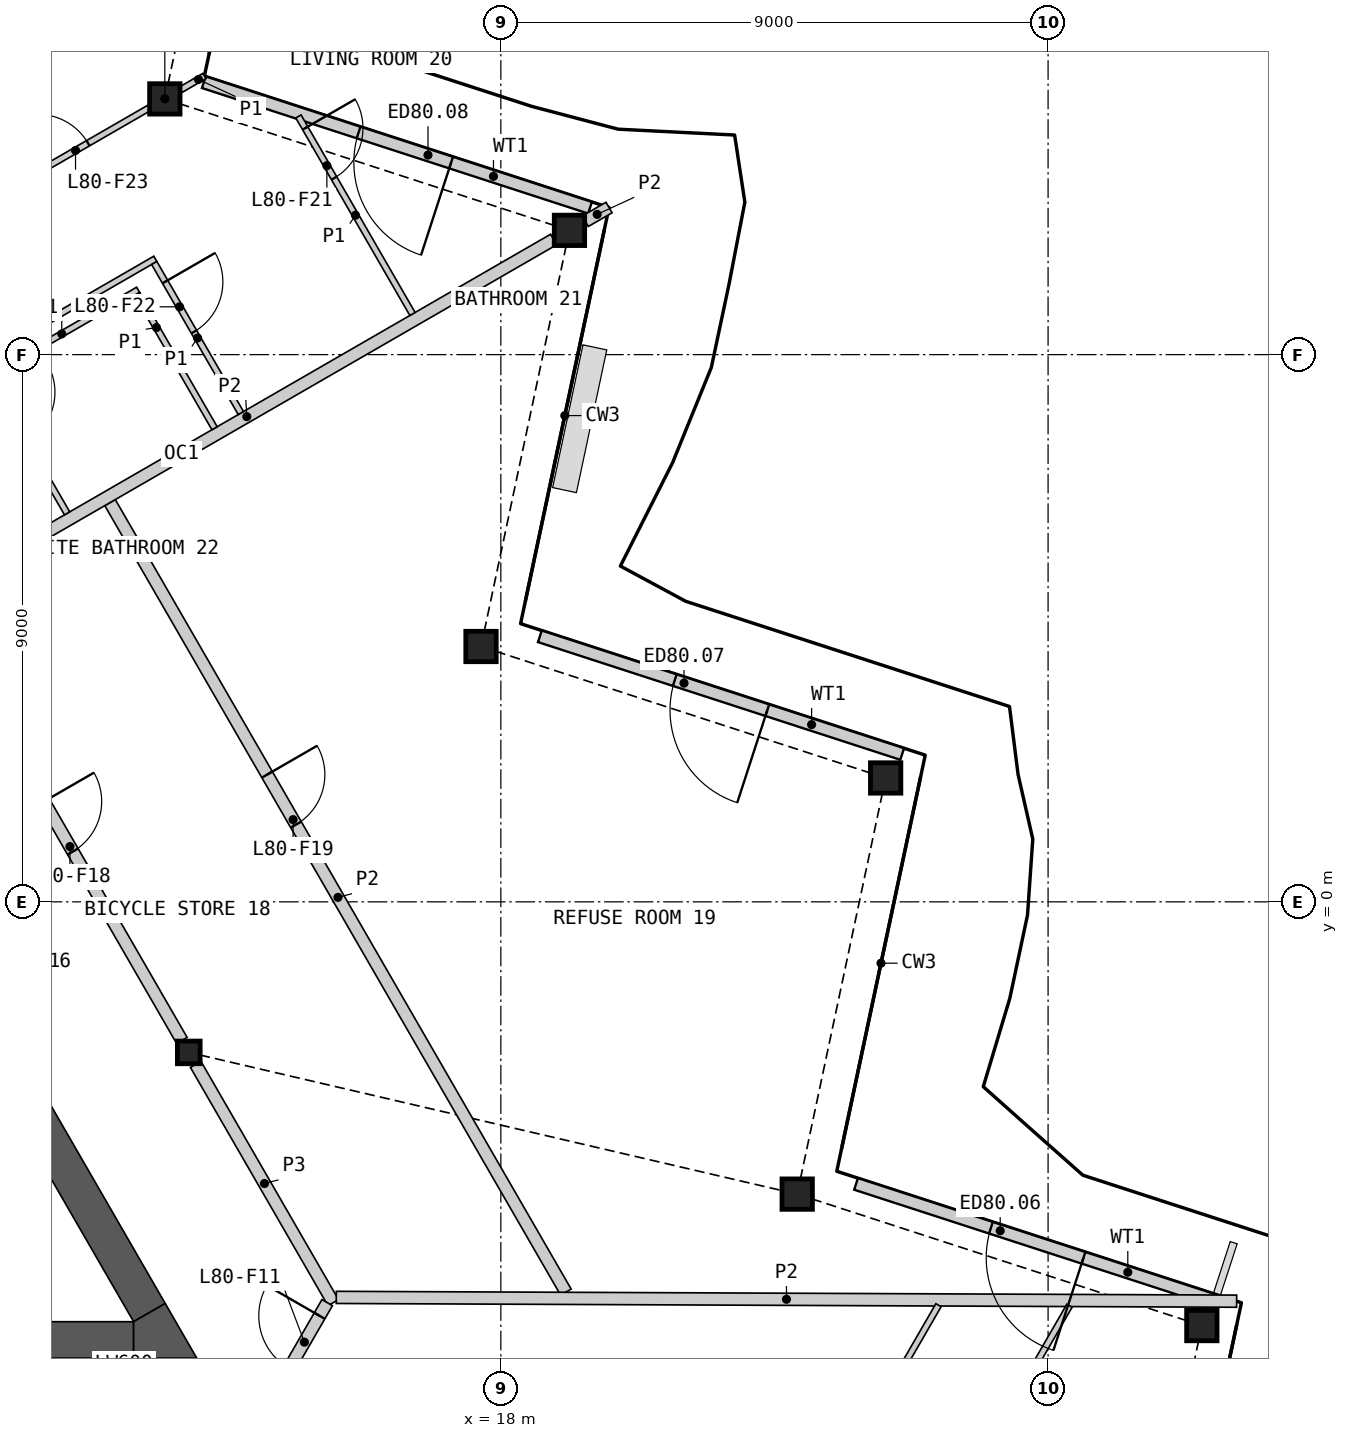
"""IFC4 building model, lengths in metres.
Left out: names, types, materials, properties, quantities, classifications, styles, units other than length and angle.
Written with IfcOpenShell. Run it as: python <this file> out.ifc"""

import sys

from ifc_helpers import new_model, si_unit, direction, frame, frame_2d, origin, origin_2d, place, context, subcontext, project, spatial, polyline, rectangle, hollow_rectangle, i_section, outline, extrude, element, fill, save


model = new_model("IFC4")
c1 = context("Model", 3, precision=1e-05, world=origin(), true_north=direction((0.0, 1.0)))
c2 = subcontext(c1, "Body", "Model", "MODEL_VIEW")
j1 = project(units=[si_unit("LENGTHUNIT", "METRE"), si_unit("PLANEANGLEUNIT", "RADIAN")], contexts=[c1])
p1 = place(None, origin())
s1 = spatial("IfcSite", under=j1, at=p1, CompositionType="ELEMENT")
p2 = place(p1, origin())
s2 = spatial("IfcBuilding", under=s1, at=p2, CompositionType="ELEMENT")
p3 = place(p2, frame((0.0, 0.0, 361.0)))
s3 = spatial("IfcBuildingStorey", under=s2, at=p3, CompositionType="ELEMENT", Elevation=361.0)
for number, where, z_axis, x_axis in (
    (1, (29.529, -6.969, 0.0), (0.0, 0.0, 1.0), (1.0, 0.0, 0.0)),
    (2, (22.874, -4.807, 0.0), (0.0, 0.0, 1.0), (1.0, 0.0, 0.0)),
    (3, (24.329, 2.037, 0.0), (0.0, 0.0, 1.0), (1.0, 0.0, 0.0)),
    (4, (17.674, 4.199, 0.0), (0.0, 0.0, 1.0), (1.0, 0.0, 0.0)),
    (5, (19.129, 11.044, 0.0), (0.0, 0.0, 1.0), (1.0, 0.0, 0.0)),
    (6, (12.474, 13.206, 0.0), (0.0, 0.0, 1.0), (1.0, 0.0, 0.0)),
):
    element("IfcColumn", number, at=place(p3, frame(where, z_axis=z_axis, x_axis=x_axis)), inside=s3, PredefinedType="COLUMN", context=c2, shape_type="SweptSolid", body=[
        extrude(hollow_rectangle(XDim=0.5, YDim=0.5, WallThickness=0.03, at=origin_2d()), origin(), (0.0, 0.0, 1.0), 3.4),
    ])
p4 = place(p3, frame((12.868, -2.476, 0.0), z_axis=(0.0, 0.0, 1.0), x_axis=(1.0, 0.0, 0.0)))
e7 = element("IfcColumn", 7, at=p4, inside=s3, PredefinedType="COLUMN", context=c2, shape_type="SweptSolid", body=[
    extrude(i_section(OverallWidth=0.374, OverallDepth=0.372, WebThickness=0.016, FlangeThickness=0.026, at=origin_2d()), origin(), (0.0, 0.0, 1.0), 3.4),
])
p5 = place(p3, frame((29.801, -6.576, 0.0), z_axis=(0.0, 0.0, 1.0), x_axis=(-0.951060123915, 0.309005891041, 0.0)))
e8 = element("IfcWall", 8, at=p5, inside=s3, PredefinedType="SOLIDWALL", context=c2, shape_type="SweptSolid", body=[
    extrude(rectangle(XDim=6.265, YDim=0.2, at=frame_2d((3.133, 0.0))), origin(), (0.0, 0.0, 1.0), 2.634),
])
p6 = place(p5, frame((2.333, 0.0, 0.0)))
e9 = element("IfcOpeningElement", 9, at=p6, cuts=e8, PredefinedType="OPENING", context=c2, shape_type="SweptSolid", body=[
    extrude(rectangle(XDim=1.6, YDim=2.25, at=frame_2d((0.8, 1.125))), frame((0.0, 0.11, 0.0), z_axis=(0.0, -1.0, 0.0), x_axis=(1.0, 0.0, 0.0)), (0.0, 0.0, 1.0), 0.22),
])
p7 = place(p3, frame((24.601, 2.431, 0.0), z_axis=(0.0, 0.0, 1.0), x_axis=(-0.951060123915, 0.309005891041, 0.0)))
e10 = element("IfcWall", 10, at=p7, inside=s3, PredefinedType="SOLIDWALL", context=c2, shape_type="SweptSolid", body=[
    extrude(rectangle(XDim=6.265, YDim=0.2, at=frame_2d((3.133, 0.0))), origin(), (0.0, 0.0, 1.0), 2.634),
])
p8 = place(p7, frame((2.333, 0.0, 0.0)))
e11 = element("IfcOpeningElement", 11, at=p8, cuts=e10, PredefinedType="OPENING", context=c2, shape_type="SweptSolid", body=[
    extrude(rectangle(XDim=1.6, YDim=2.25, at=frame_2d((0.8, 1.125))), frame((0.0, 0.11, 0.0), z_axis=(0.0, -1.0, 0.0), x_axis=(1.0, 0.0, 0.0)), (0.0, 0.0, 1.0), 0.22),
])
p9 = place(p3, frame((19.467, 11.416, 0.0), z_axis=(0.0, 0.0, 1.0), x_axis=(-0.951057706878, 0.309013330114, 0.0)))
e12 = element("IfcWall", 12, at=p9, inside=s3, PredefinedType="SOLIDWALL", context=c2, shape_type="SweptSolid", body=[
    extrude(rectangle(XDim=6.678, YDim=0.2, at=frame_2d((3.339, 0.0))), origin(), (0.0, 0.0, 1.0), 2.634),
])
p10 = place(p9, frame((2.402, 0.0, 0.0)))
e13 = element("IfcOpeningElement", 13, at=p10, cuts=e12, PredefinedType="OPENING", context=c2, shape_type="SweptSolid", body=[
    extrude(rectangle(XDim=1.6, YDim=2.25, at=frame_2d((0.8, 1.125))), frame((0.0, 0.11, 0.0), z_axis=(0.0, -1.0, 0.0), x_axis=(1.0, 0.0, 0.0)), (0.0, 0.0, 1.0), 0.22),
])
p11 = place(p3, frame((-11.961, -7.206, 0.0), z_axis=(0.0, 0.0, 1.0), x_axis=(1.0, 0.0, 0.0)))
e14 = element("IfcWall", 14, at=p11, inside=s3, PredefinedType="SHEAR", context=c2, shape_type="SweptSolid", body=[
    extrude(rectangle(XDim=23.921, YDim=0.6, at=frame_2d((11.961, 0.0))), origin(), (0.0, 0.0, 1.0), 3.1),
])
p12 = place(p3, frame((12.221, -6.756, 0.0), z_axis=(0.0, 0.0, 1.0), x_axis=(-0.50000604952, 0.866021911064, 0.0)))
e15 = element("IfcWall", 15, at=p12, inside=s3, PredefinedType="SHEAR", context=c2, shape_type="SweptSolid", body=[
    extrude(rectangle(XDim=4.869, YDim=0.6, at=frame_2d((2.434, 0.0))), origin(), (0.0, 0.0, 1.0), 3.1),
])
p13 = place(p3, origin())
e16 = element("IfcWall", 16, at=p13, inside=s3, PredefinedType="SHEAR", context=c2, shape_type="SweptSolid", body=[
    extrude(outline(polyline([(11.961, -7.506), (11.961, -6.906), (12.48, -6.606), (13.0, -7.506), (11.961, -7.506)])), origin(), (0.0, 0.0, 1.0), 3.1),
])
p14 = place(p3, frame((8.692, 4.756, 0.0), z_axis=(0.0, 0.0, 1.0), x_axis=(0.500001682468, -0.866024432409, 0.0)))
e17 = element("IfcWall", 17, at=p14, inside=s3, PredefinedType="PARTITIONING", context=c2, shape_type="SweptSolid", body=[
    extrude(rectangle(XDim=8.124, YDim=0.2, at=frame_2d((4.062, 0.0))), origin(), (0.0, 0.0, 1.0), 3.1),
])
p15 = place(p14, frame((3.587, 0.0, 0.0)))
e18 = element("IfcOpeningElement", 18, at=p15, cuts=e17, PredefinedType="OPENING", context=c2, shape_type="SweptSolid", body=[
    extrude(rectangle(XDim=0.95, YDim=2.1, at=frame_2d((0.475, 1.05))), frame((0.0, 0.11, 0.0), z_axis=(0.0, -1.0, 0.0), x_axis=(1.0, 0.0, 0.0)), (0.0, 0.0, 1.0), 0.22),
])
p16 = place(p3, frame((12.981, -2.673, 0.0), z_axis=(0.0, 0.0, 1.0), x_axis=(0.499974648164, -0.866040040179, 0.0)))
e19 = element("IfcWall", 19, at=p16, inside=s3, PredefinedType="PARTITIONING", context=c2, shape_type="SweptSolid", body=[
    extrude(rectangle(XDim=4.525, YDim=0.2, at=frame_2d((2.263, 0.0))), origin(), (0.0, 0.0, 1.0), 3.1),
])
p17 = place(p3, frame((13.293, -9.797, 0.0), z_axis=(0.0, 0.0, 1.0), x_axis=(0.499977520935, 0.86603838169, 0.0)))
e20 = element("IfcWall", 20, at=p17, inside=s3, PredefinedType="PARTITIONING", context=c2, shape_type="SweptSolid", body=[
    extrude(rectangle(XDim=3.701, YDim=0.2, at=frame_2d((1.851, 0.0))), origin(), (0.0, 0.0, 1.0), 3.1),
])
p18 = place(p17, frame((2.451, 0.0, 0.0)))
e21 = element("IfcOpeningElement", 21, at=p18, cuts=e20, PredefinedType="OPENING", context=c2, shape_type="SweptSolid", body=[
    extrude(rectangle(XDim=1.0, YDim=2.1, at=frame_2d((0.5, 1.05))), frame((0.0, 0.11, 0.0), z_axis=(0.0, -1.0, 0.0), x_axis=(1.0, 0.0, 0.0)), (0.0, 0.0, 1.0), 0.22),
])
p19 = place(p3, frame((11.573, 6.566, 0.0), z_axis=(0.0, 0.0, 1.0), x_axis=(0.499993542657, -0.866029131901, 0.0)))
e22 = element("IfcWall", 22, at=p19, inside=s3, PredefinedType="PARTITIONING", context=c2, shape_type="SweptSolid", body=[
    extrude(rectangle(XDim=14.994, YDim=0.2, at=frame_2d((7.497, 0.0))), origin(), (0.0, 0.0, 1.0), 2.33),
])
p20 = place(p19, frame((5.166, 0.0, 0.0)))
e23 = element("IfcOpeningElement", 23, at=p20, cuts=e22, PredefinedType="OPENING", context=c2, shape_type="SweptSolid", body=[
    extrude(rectangle(XDim=0.95, YDim=2.1, at=frame_2d((0.475, 1.05))), frame((0.0, 0.11, 0.0), z_axis=(0.0, -1.0, 0.0), x_axis=(1.0, 0.0, 0.0)), (0.0, 0.0, 1.0), 0.22),
])
p21 = place(p3, frame((15.294, -6.506, 0.0), z_axis=(0.0, 0.0, 1.0), x_axis=(0.99999116141, -0.004204414611, 0.0)))
e24 = element("IfcWall", 24, at=p21, inside=s3, PredefinedType="PARTITIONING", context=c2, shape_type="SweptSolid", body=[
    extrude(rectangle(XDim=14.807, YDim=0.2, at=frame_2d((7.404, 0.0))), origin(), (0.0, 0.0, 1.0), 2.33),
])
p22 = place(p3, frame((8.775, 5.066, 0.0), z_axis=(0.0, 0.0, 1.0), x_axis=(0.866023724155, 0.500002909193, 0.0)))
e25 = element("IfcWall", 25, at=p22, inside=s3, PredefinedType="PARTITIONING", context=c2, shape_type="SweptSolid", body=[
    extrude(rectangle(XDim=11.655, YDim=0.2, at=frame_2d((5.827, 0.0))), origin(), (0.0, 0.0, 1.0), 2.33),
])
p23 = place(p3, frame((19.389, 11.194, 0.0), z_axis=(0.0, 0.0, 1.0), x_axis=(0.866104518135, 0.499862944882, 0.0)))
e26 = element("IfcWall", 26, at=p23, inside=s3, PredefinedType="PARTITIONING", context=c2, shape_type="SweptSolid", body=[
    extrude(rectangle(XDim=0.451, YDim=0.2, at=frame_2d((0.226, 0.0))), origin(), (0.0, 0.0, 1.0), 2.33),
])
p24 = place(p3, frame((3.465, 14.01, 0.0), z_axis=(0.0, 0.0, 1.0), x_axis=(0.866032376801, 0.499987922186, 0.0)))
e27 = element("IfcWall", 27, at=p24, inside=s3, PredefinedType="PARTITIONING", context=c2, shape_type="SweptSolid", body=[
    extrude(rectangle(XDim=11.782, YDim=0.1, at=frame_2d((5.891, 0.0))), origin(), (0.0, 0.0, 1.0), 2.33),
])
p25 = place(p24, frame((6.67, 0.0, 0.0)))
e28 = element("IfcOpeningElement", 28, at=p25, cuts=e27, PredefinedType="OPENING", context=c2, shape_type="SweptSolid", body=[
    extrude(rectangle(XDim=0.95, YDim=2.1, at=frame_2d((0.475, 1.05))), frame((0.0, 0.06, 0.0), z_axis=(0.0, -1.0, 0.0), x_axis=(1.0, 0.0, 0.0)), (0.0, 0.0, 1.0), 0.12),
])
p26 = place(p3, frame((23.415, -13.461, 0.0), z_axis=(0.0, 0.0, 1.0), x_axis=(0.500011483804, 0.866018773506, 0.0)))
e29 = element("IfcWall", 29, at=p26, inside=s3, PredefinedType="PARTITIONING", context=c2, shape_type="SweptSolid", body=[
    extrude(rectangle(XDim=7.872, YDim=0.1, at=frame_2d((3.936, 0.0))), origin(), (0.0, 0.0, 1.0), 2.33),
])
p27 = place(p26, frame((3.461, 0.0, 0.0)))
e30 = element("IfcOpeningElement", 30, at=p27, cuts=e29, PredefinedType="OPENING", context=c2, shape_type="SweptSolid", body=[
    extrude(rectangle(XDim=0.95, YDim=2.1, at=frame_2d((0.475, 1.05))), frame((0.0, 0.06, 0.0), z_axis=(0.0, -1.0, 0.0), x_axis=(1.0, 0.0, 0.0)), (0.0, 0.0, 1.0), 0.12),
])
p28 = place(p3, frame((6.065, 9.506, 0.0), z_axis=(0.0, 0.0, 1.0), x_axis=(0.866018949465, 0.500011179042, 0.0)))
e31 = element("IfcWall", 31, at=p28, inside=s3, PredefinedType="PARTITIONING", context=c2, shape_type="SweptSolid", body=[
    extrude(rectangle(XDim=7.1, YDim=0.1, at=frame_2d((3.55, 0.0))), origin(), (0.0, 0.0, 1.0), 2.33),
])
p29 = place(p28, frame((4.992, 0.0, 0.0)))
e32 = element("IfcOpeningElement", 32, at=p29, cuts=e31, PredefinedType="OPENING", context=c2, shape_type="SweptSolid", body=[
    extrude(rectangle(XDim=0.95, YDim=2.1, at=frame_2d((0.475, 1.05))), frame((0.0, 0.06, 0.0), z_axis=(0.0, -1.0, 0.0), x_axis=(1.0, 0.0, 0.0)), (0.0, 0.0, 1.0), 0.12),
])
p30 = place(p3, frame((21.796, -12.526, 0.0), z_axis=(0.0, 0.0, 1.0), x_axis=(0.499994777381, 0.866028419044, 0.0)))
e33 = element("IfcWall", 33, at=p30, inside=s3, PredefinedType="PARTITIONING", context=c2, shape_type="SweptSolid", body=[
    extrude(rectangle(XDim=6.803, YDim=0.1, at=frame_2d((3.402, 0.0))), origin(), (0.0, 0.0, 1.0), 2.33),
])
p31 = place(p30, frame((1.361, 0.0, 0.0)))
e34 = element("IfcOpeningElement", 34, at=p31, cuts=e33, PredefinedType="OPENING", context=c2, shape_type="SweptSolid", body=[
    extrude(rectangle(XDim=0.95, YDim=2.1, at=frame_2d((0.475, 1.05))), frame((0.0, 0.06, 0.0), z_axis=(0.0, -1.0, 0.0), x_axis=(1.0, 0.0, 0.0)), (0.0, 0.0, 1.0), 0.12),
])
p32 = place(p3, frame((7.165, 7.601, 0.0), z_axis=(0.0, 0.0, 1.0), x_axis=(0.866017493347, 0.500013701029, 0.0)))
e35 = element("IfcWall", 35, at=p32, inside=s3, PredefinedType="PARTITIONING", context=c2, shape_type="SweptSolid", body=[
    extrude(rectangle(XDim=5.95, YDim=0.1, at=frame_2d((2.975, 0.0))), origin(), (0.0, 0.0, 1.0), 2.33),
])
p33 = place(p3, frame((14.671, 12.918, 0.0), z_axis=(0.0, 0.0, 1.0), x_axis=(0.499981580887, -0.866036037803, 0.0)))
e36 = element("IfcWall", 36, at=p33, inside=s3, PredefinedType="PARTITIONING", context=c2, shape_type="SweptSolid", body=[
    extrude(rectangle(XDim=3.752, YDim=0.1, at=frame_2d((1.876, 0.0))), origin(), (0.0, 0.0, 1.0), 2.33),
])
p34 = place(p33, frame((0.222, 0.0, 0.0)))
e37 = element("IfcOpeningElement", 37, at=p34, cuts=e36, PredefinedType="OPENING", context=c2, shape_type="SweptSolid", body=[
    extrude(rectangle(XDim=0.95, YDim=2.1, at=frame_2d((0.475, 1.05))), frame((0.0, 0.06, 0.0), z_axis=(0.0, -1.0, 0.0), x_axis=(1.0, 0.0, 0.0)), (0.0, 0.0, 1.0), 0.12),
])
p35 = place(p3, frame((12.3, 10.508, 0.0), z_axis=(0.0, 0.0, 1.0), x_axis=(0.499999279071, -0.866025820012, 0.0)))
e38 = element("IfcWall", 38, at=p35, inside=s3, PredefinedType="PARTITIONING", context=c2, shape_type="SweptSolid", body=[
    extrude(rectangle(XDim=2.85, YDim=0.1, at=frame_2d((1.425, 0.0))), origin(), (0.0, 0.0, 1.0), 2.33),
])
p36 = place(p35, frame((0.358, 0.0, 0.0)))
e39 = element("IfcOpeningElement", 39, at=p36, cuts=e38, PredefinedType="OPENING", context=c2, shape_type="SweptSolid", body=[
    extrude(rectangle(XDim=0.95, YDim=2.1, at=frame_2d((0.475, 1.05))), frame((0.0, 0.06, 0.0), z_axis=(0.0, -1.0, 0.0), x_axis=(1.0, 0.0, 0.0)), (0.0, 0.0, 1.0), 0.12),
])
p37 = place(p3, frame((9.523, 8.616, 0.0), z_axis=(0.0, 0.0, 1.0), x_axis=(0.866032775405, 0.499987231761, 0.0)))
e40 = element("IfcWall", 40, at=p37, inside=s3, PredefinedType="PARTITIONING", context=c2, shape_type="SweptSolid", body=[
    extrude(rectangle(XDim=2.9, YDim=0.1, at=frame_2d((1.45, 0.0))), origin(), (0.0, 0.0, 1.0), 2.33),
])
p38 = place(p3, frame((12.017, 9.998, 0.0), z_axis=(0.0, 0.0, 1.0), x_axis=(0.499948979701, -0.866054858364, 0.0)))
e41 = element("IfcWall", 41, at=p38, inside=s3, PredefinedType="PARTITIONING", context=c2, shape_type="SweptSolid", body=[
    extrude(rectangle(XDim=2.55, YDim=0.1, at=frame_2d((1.275, 0.0))), origin(), (0.0, 0.0, 1.0), 2.33),
])
p39 = place(p3, frame((9.592, 8.598, 0.0), z_axis=(0.0, 0.0, 1.0), x_axis=(0.499990435942, -0.866030925526, 0.0)))
e42 = element("IfcWall", 42, at=p39, inside=s3, PredefinedType="PARTITIONING", context=c2, shape_type="SweptSolid", body=[
    extrude(rectangle(XDim=2.55, YDim=0.1, at=frame_2d((1.275, 0.0))), origin(), (0.0, 0.0, 1.0), 2.33),
])
p40 = place(p39, frame((0.25, 0.0, 0.0)))
e43 = element("IfcOpeningElement", 43, at=p40, cuts=e42, PredefinedType="OPENING", context=c2, shape_type="SweptSolid", body=[
    extrude(rectangle(XDim=0.95, YDim=2.1, at=frame_2d((0.475, 1.05))), frame((0.0, 0.06, 0.0), z_axis=(0.0, -1.0, 0.0), x_axis=(1.0, 0.0, 0.0)), (0.0, 0.0, 1.0), 0.12),
])
p41 = place(p3, frame((12.734, 13.356, 0.0), z_axis=(0.0, 0.0, 1.0), x_axis=(0.865870279271, 0.500268587336, 0.0)))
e44 = element("IfcWall", 44, at=p41, inside=s3, PredefinedType="PARTITIONING", context=c2, shape_type="SweptSolid", body=[
    extrude(rectangle(XDim=0.451, YDim=0.1, at=frame_2d((0.226, 0.0))), origin(), (0.0, 0.0, 1.0), 2.33),
])
p42 = place(p6, origin())
e45 = element("IfcDoor", 45, at=p42, inside=s3, OperationType="DOUBLE_DOOR_SINGLE_SWING", PredefinedType="DOOR", context=c2, shape_type="SweptSolid", body=[
    extrude(rectangle(XDim=1.6, YDim=2.25, at=frame_2d((0.8, 1.125))), frame((0.0, 0.025, 0.0), z_axis=(0.0, -1.0, 0.0), x_axis=(1.0, 0.0, 0.0)), (0.0, 0.0, 1.0), 0.05),
])
fill(e9, e45)
p43 = place(p8, origin())
e46 = element("IfcDoor", 46, at=p43, inside=s3, OperationType="DOUBLE_DOOR_SINGLE_SWING", PredefinedType="DOOR", context=c2, shape_type="SweptSolid", body=[
    extrude(rectangle(XDim=1.6, YDim=2.25, at=frame_2d((0.8, 1.125))), frame((0.0, 0.025, 0.0), z_axis=(0.0, -1.0, 0.0), x_axis=(1.0, 0.0, 0.0)), (0.0, 0.0, 1.0), 0.05),
])
fill(e11, e46)
p44 = place(p10, origin())
e47 = element("IfcDoor", 47, at=p44, inside=s3, OperationType="DOUBLE_DOOR_SINGLE_SWING", PredefinedType="DOOR", context=c2, shape_type="SweptSolid", body=[
    extrude(rectangle(XDim=1.6, YDim=2.25, at=frame_2d((0.8, 1.125))), frame((0.0, 0.025, 0.0), z_axis=(0.0, -1.0, 0.0), x_axis=(1.0, 0.0, 0.0)), (0.0, 0.0, 1.0), 0.05),
])
fill(e13, e47)
p45 = place(p18, origin())
e48 = element("IfcDoor", 48, at=p45, inside=s3, OperationType="SINGLE_SWING_RIGHT", PredefinedType="DOOR", context=c2, shape_type="SweptSolid", body=[
    extrude(rectangle(XDim=1.0, YDim=2.1, at=frame_2d((0.5, 1.05))), frame((0.0, 0.025, 0.0), z_axis=(0.0, -1.0, 0.0), x_axis=(1.0, 0.0, 0.0)), (0.0, 0.0, 1.0), 0.05),
])
fill(e21, e48)
p46 = place(p15, origin())
e49 = element("IfcDoor", 49, at=p46, inside=s3, OperationType="SINGLE_SWING_LEFT", PredefinedType="DOOR", context=c2, shape_type="SweptSolid", body=[
    extrude(rectangle(XDim=0.95, YDim=2.1, at=frame_2d((0.475, 1.05))), frame((0.0, 0.025, 0.0), z_axis=(0.0, -1.0, 0.0), x_axis=(1.0, 0.0, 0.0)), (0.0, 0.0, 1.0), 0.05),
])
fill(e18, e49)
p47 = place(p20, origin())
e50 = element("IfcDoor", 50, at=p47, inside=s3, OperationType="SINGLE_SWING_LEFT", PredefinedType="DOOR", context=c2, shape_type="SweptSolid", body=[
    extrude(rectangle(XDim=0.95, YDim=2.1, at=frame_2d((0.475, 1.05))), frame((0.0, 0.025, 0.0), z_axis=(0.0, -1.0, 0.0), x_axis=(1.0, 0.0, 0.0)), (0.0, 0.0, 1.0), 0.05),
])
fill(e23, e50)
p48 = place(p34, origin())
e51 = element("IfcDoor", 51, at=p48, inside=s3, OperationType="SINGLE_SWING_LEFT", PredefinedType="DOOR", context=c2, shape_type="SweptSolid", body=[
    extrude(rectangle(XDim=0.95, YDim=2.1, at=frame_2d((0.475, 1.05))), frame((0.0, 0.025, 0.0), z_axis=(0.0, -1.0, 0.0), x_axis=(1.0, 0.0, 0.0)), (0.0, 0.0, 1.0), 0.05),
])
fill(e37, e51)
p49 = place(p36, origin())
e52 = element("IfcDoor", 52, at=p49, inside=s3, OperationType="SINGLE_SWING_LEFT", PredefinedType="DOOR", context=c2, shape_type="SweptSolid", body=[
    extrude(rectangle(XDim=0.95, YDim=2.1, at=frame_2d((0.475, 1.05))), frame((0.0, 0.025, 0.0), z_axis=(0.0, -1.0, 0.0), x_axis=(1.0, 0.0, 0.0)), (0.0, 0.0, 1.0), 0.05),
])
fill(e39, e52)
p50 = place(p29, origin())
e53 = element("IfcDoor", 53, at=p50, inside=s3, OperationType="SINGLE_SWING_LEFT", PredefinedType="DOOR", context=c2, shape_type="SweptSolid", body=[
    extrude(rectangle(XDim=0.95, YDim=2.1, at=frame_2d((0.475, 1.05))), frame((0.0, 0.025, 0.0), z_axis=(0.0, -1.0, 0.0), x_axis=(1.0, 0.0, 0.0)), (0.0, 0.0, 1.0), 0.05),
])
fill(e32, e53)
save(model, sys.argv[1])
